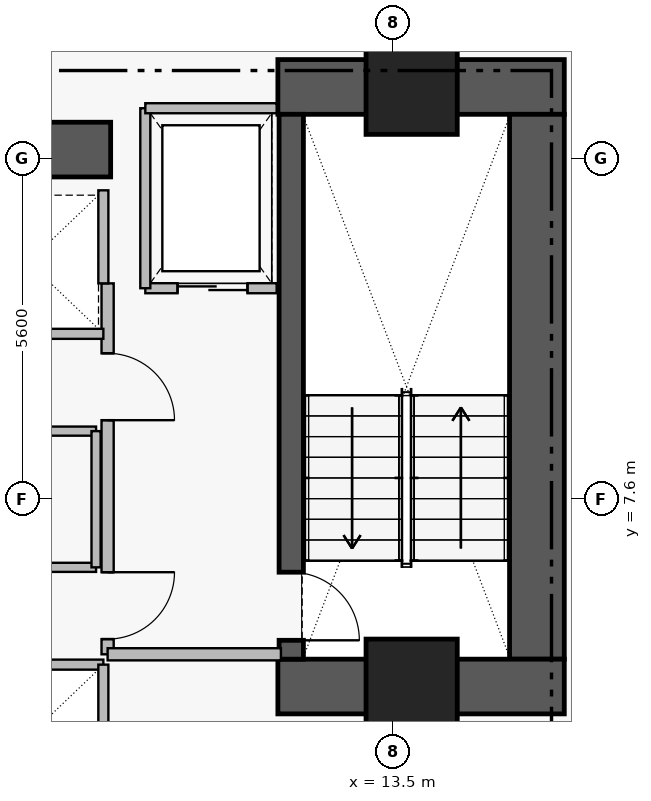
"""IFC4 building model, lengths in metres.
Left out: names, types, materials, properties, quantities, classifications, styles, units other than length and angle.
Written with IfcOpenShell. Run it as: python <this file> out.ifc"""

import sys

from ifc_helpers import new_model, si_unit, direction, frame, frame_2d, origin, origin_2d, place, context, subcontext, project, spatial, rectangle, extrude, element, fill, save


model = new_model("IFC4")
c1 = context("Model", 3, precision=1e-05, world=origin(), true_north=direction((0.0, 1.0)))
c2 = subcontext(c1, "Body", "Model", "MODEL_VIEW")
j1 = project(units=[si_unit("LENGTHUNIT", "METRE"), si_unit("PLANEANGLEUNIT", "RADIAN")], contexts=[c1])
p1 = place(None, origin())
s1 = spatial("IfcSite", under=j1, at=p1, CompositionType="ELEMENT")
p2 = place(p1, origin())
s2 = spatial("IfcBuilding", under=s1, at=p2, CompositionType="ELEMENT")
p3 = place(p2, frame((0.0, 0.0, 11.4)))
s3 = spatial("IfcBuildingStorey", under=s2, at=p3, CompositionType="ELEMENT", Elevation=11.4)
p4 = place(p3, frame((11.6, 14.38, 0.0), z_axis=(0.0, 0.0, 1.0), x_axis=(1.0, 0.0, 0.0)))
e1 = element("IfcWall", 1, at=p4, inside=s3, PredefinedType="SHEAR", context=c2, shape_type="SweptSolid", body=[
    extrude(rectangle(XDim=4.71, YDim=0.9, at=frame_2d((2.355, 0.0))), origin(), (0.0, 0.0, 1.0), 6.41),
])
p5 = place(p3, frame((15.86, 4.97, 0.0), z_axis=(0.0, 0.0, 1.0), x_axis=(0.0, 1.0, 0.0)))
e2 = element("IfcWall", 2, at=p5, inside=s3, PredefinedType="SHEAR", context=c2, shape_type="SweptSolid", body=[
    extrude(rectangle(XDim=8.96, YDim=0.9, at=frame_2d((4.48, 0.0))), origin(), (0.0, 0.0, 1.0), 6.41),
])
p6 = place(p3, frame((11.6, 4.52, 0.0), z_axis=(0.0, 0.0, 1.0), x_axis=(1.0, 0.0, 0.0)))
e3 = element("IfcWall", 3, at=p6, inside=s3, PredefinedType="SHEAR", context=c2, shape_type="SweptSolid", body=[
    extrude(rectangle(XDim=4.71, YDim=0.9, at=frame_2d((2.355, 0.0))), origin(), (0.0, 0.0, 1.0), 6.41),
])
p7 = place(p3, frame((1.25, 13.35, 0.0), z_axis=(0.0, 0.0, 1.0), x_axis=(1.0, 0.0, 0.0)))
e4 = element("IfcWall", 4, at=p7, inside=s3, PredefinedType="SHEAR", context=c2, shape_type="SweptSolid", body=[
    extrude(rectangle(XDim=7.6, YDim=0.9, at=frame_2d((3.8, 0.0))), origin(), (0.0, 0.0, 1.0), 6.34),
])
p8 = place(p3, frame((11.82, 13.93, 0.0), z_axis=(0.0, 0.0, 1.0), x_axis=(0.0, -1.0, 0.0)))
e5 = element("IfcWall", 5, at=p8, inside=s3, PredefinedType="SHEAR", context=c2, shape_type="SweptSolid", body=[
    extrude(rectangle(XDim=8.96, YDim=0.4, at=frame_2d((4.48, 0.0))), origin(), (0.0, 0.0, 1.0), 6.41),
])
p9 = place(p8, frame((7.53, 0.0, 0.0)))
e6 = element("IfcOpeningElement", 6, at=p9, cuts=e5, PredefinedType="OPENING", context=c2, shape_type="SweptSolid", body=[
    extrude(rectangle(XDim=1.12, YDim=2.22, at=frame_2d((0.56, 1.11))), frame((0.0, 0.21, 0.0), z_axis=(0.0, -1.0, 0.0), x_axis=(1.0, 0.0, 0.0)), (0.0, 0.0, 1.0), 0.42),
])
for number, where, z_axis, x_axis in (
    (7, (13.8, 14.35, 0.0), (0.0, 0.0, 1.0), (1.0, 0.0, 0.0)),
    (8, (13.8, 4.55, 0.0), (0.0, 0.0, 1.0), (1.0, 0.0, 0.0)),
):
    element("IfcColumn", number, at=place(p3, frame(where, z_axis=z_axis, x_axis=x_axis)), inside=s3, PredefinedType="COLUMN", context=c2, shape_type="SweptSolid", body=[
        extrude(rectangle(XDim=1.5, YDim=1.5, at=origin_2d()), origin(), (0.0, 0.0, 1.0), 6.6),
    ])
p10 = place(p3, frame((8.8, 11.15, 0.0), z_axis=(0.0, 0.0, 1.0), x_axis=(0.0, -1.0, 0.0)))
e9 = element("IfcWall", 9, at=p10, inside=s3, PredefinedType="PARTITIONING", context=c2, shape_type="SweptSolid", body=[
    extrude(rectangle(XDim=6.1, YDim=0.2, at=frame_2d((3.05, 0.0))), origin(), (0.0, 0.0, 1.0), 6.34),
])
p11 = place(p10, frame((1.15, 0.0, 0.0)))
e10 = element("IfcOpeningElement", 10, at=p11, cuts=e9, PredefinedType="OPENING", context=c2, shape_type="SweptSolid", body=[
    extrude(rectangle(XDim=1.1, YDim=2.2, at=frame_2d((0.55, 1.1))), frame((0.0, 0.11, 0.0), z_axis=(0.0, -1.0, 0.0), x_axis=(1.0, 0.0, 0.0)), (0.0, 0.0, 1.0), 0.22),
])
p12 = place(p10, frame((4.75, 0.0, 0.0)))
e11 = element("IfcOpeningElement", 11, at=p12, cuts=e9, PredefinedType="OPENING", context=c2, shape_type="SweptSolid", body=[
    extrude(rectangle(XDim=1.1, YDim=2.2, at=frame_2d((0.55, 1.1))), frame((0.0, 0.11, 0.0), z_axis=(0.0, -1.0, 0.0), x_axis=(1.0, 0.0, 0.0)), (0.0, 0.0, 1.0), 0.22),
])
p13 = place(p3, frame((9.42, 11.07, 0.0), z_axis=(0.0, 0.0, 1.0), x_axis=(1.0, 0.0, 0.0)))
e12 = element("IfcWall", 12, at=p13, inside=s3, PredefinedType="PARTITIONING", context=c2, shape_type="SweptSolid", body=[
    extrude(rectangle(XDim=2.16, YDim=0.165, at=frame_2d((1.08, 0.0))), origin(), (0.0, 0.0, 1.0), 6.34),
])
p14 = place(p13, frame((0.53, 0.0, 0.0)))
e13 = element("IfcOpeningElement", 13, at=p14, cuts=e12, PredefinedType="OPENING", context=c2, shape_type="SweptSolid", body=[
    extrude(rectangle(XDim=1.15, YDim=2.25, at=frame_2d((0.575, 1.125))), frame((0.0, 0.093, 0.0), z_axis=(0.0, -1.0, 0.0), x_axis=(1.0, 0.0, 0.0)), (0.0, 0.0, 1.0), 0.185),
])
p15 = place(p3, frame((4.37, 6.48, 0.0), z_axis=(0.0, 0.0, 1.0), x_axis=(1.0, 0.0, 0.0)))
e14 = element("IfcWall", 14, at=p15, inside=s3, PredefinedType="PARTITIONING", context=c2, shape_type="SweptSolid", body=[
    extrude(rectangle(XDim=4.24, YDim=0.15, at=frame_2d((2.12, 0.0))), origin(), (0.0, 0.0, 1.0), 6.34),
])
p16 = place(p15, frame((1.67, 0.0, 0.0)))
e15 = element("IfcOpeningElement", 15, at=p16, cuts=e14, PredefinedType="OPENING", context=c2, shape_type="SweptSolid", body=[
    extrude(rectangle(XDim=0.9, YDim=2.15, at=frame_2d((0.45, 1.075))), frame((0.0, 0.085, 0.0), z_axis=(0.0, -1.0, 0.0), x_axis=(1.0, 0.0, 0.0)), (0.0, 0.0, 1.0), 0.17),
])
p17 = place(p3, frame((8.8, 5.05, 0.0), z_axis=(0.0, 0.0, 1.0), x_axis=(1.0, 0.0, 0.0)))
e16 = element("IfcWall", 16, at=p17, inside=s3, PredefinedType="PARTITIONING", context=c2, shape_type="SweptSolid", body=[
    extrude(rectangle(XDim=2.85, YDim=0.2, at=frame_2d((1.425, 0.0))), origin(), (0.0, 0.0, 1.0), 6.34),
])
p18 = place(p3, frame((9.42, 11.07, 0.0), z_axis=(0.0, 0.0, 1.0), x_axis=(0.0, 1.0, 0.0)))
e17 = element("IfcWall", 17, at=p18, inside=s3, PredefinedType="PARTITIONING", context=c2, shape_type="SweptSolid", body=[
    extrude(rectangle(XDim=2.96, YDim=0.165, at=frame_2d((1.48, 0.0))), origin(), (0.0, 0.0, 1.0), 6.34),
])
p19 = place(p3, frame((9.42, 14.03, 0.0), z_axis=(0.0, 0.0, 1.0), x_axis=(1.0, 0.0, 0.0)))
e18 = element("IfcWall", 18, at=p19, inside=s3, PredefinedType="PARTITIONING", context=c2, shape_type="SweptSolid", body=[
    extrude(rectangle(XDim=2.16, YDim=0.165, at=frame_2d((1.08, 0.0))), origin(), (0.0, 0.0, 1.0), 6.34),
])
p20 = place(p3, frame((6.25, 4.88, 0.0), z_axis=(0.0, 0.0, 1.0), x_axis=(1.0, 0.0, 0.0)))
e19 = element("IfcWall", 19, at=p20, inside=s3, PredefinedType="PARTITIONING", context=c2, shape_type="SweptSolid", body=[
    extrude(rectangle(XDim=2.48, YDim=0.165, at=frame_2d((1.24, 0.0))), origin(), (0.0, 0.0, 1.0), 6.34),
])
p21 = place(p3, frame((8.73, 2.52, 0.0), z_axis=(0.0, 0.0, 1.0), x_axis=(0.0, 1.0, 0.0)))
e20 = element("IfcWall", 20, at=p21, inside=s3, PredefinedType="PARTITIONING", context=c2, shape_type="SweptSolid", body=[
    extrude(rectangle(XDim=2.36, YDim=0.165, at=frame_2d((1.18, 0.0))), origin(), (0.0, 0.0, 1.0), 6.34),
])
p22 = place(p3, frame((6.25, 10.32, 0.0), z_axis=(0.0, 0.0, 1.0), x_axis=(1.0, 0.0, 0.0)))
e21 = element("IfcWall", 21, at=p22, inside=s3, PredefinedType="PARTITIONING", context=c2, shape_type="SweptSolid", body=[
    extrude(rectangle(XDim=2.48, YDim=0.165, at=frame_2d((1.24, 0.0))), origin(), (0.0, 0.0, 1.0), 6.34),
])
p23 = place(p3, frame((8.73, 11.15, 0.0), z_axis=(0.0, 0.0, 1.0), x_axis=(0.0, 1.0, 0.0)))
e22 = element("IfcWall", 22, at=p23, inside=s3, PredefinedType="PARTITIONING", context=c2, shape_type="SweptSolid", body=[
    extrude(rectangle(XDim=1.53, YDim=0.165, at=frame_2d((0.765, 0.0))), origin(), (0.0, 0.0, 1.0), 6.34),
])
p24 = place(p3, frame((4.37, 8.72, 0.0), z_axis=(0.0, 0.0, 1.0), x_axis=(1.0, 0.0, 0.0)))
e23 = element("IfcWall", 23, at=p24, inside=s3, PredefinedType="PARTITIONING", context=c2, shape_type="SweptSolid", body=[
    extrude(rectangle(XDim=4.24, YDim=0.15, at=frame_2d((2.12, 0.0))), origin(), (0.0, 0.0, 1.0), 6.34),
])
p25 = place(p3, frame((8.61, 6.48, 0.0), z_axis=(0.0, 0.0, 1.0), x_axis=(0.0, 1.0, 0.0)))
e24 = element("IfcWall", 24, at=p25, inside=s3, PredefinedType="PARTITIONING", context=c2, shape_type="SweptSolid", body=[
    extrude(rectangle(XDim=2.24, YDim=0.15, at=frame_2d((1.12, 0.0))), origin(), (0.0, 0.0, 1.0), 6.34),
])
p26 = place(p9, origin())
e25 = element("IfcDoor", 25, at=p26, inside=s3, OperationType="SINGLE_SWING_RIGHT", PredefinedType="DOOR", context=c2, shape_type="SweptSolid", body=[
    extrude(rectangle(XDim=1.12, YDim=2.22, at=frame_2d((0.56, 1.11))), frame((0.0, 0.025, 0.0), z_axis=(0.0, -1.0, 0.0), x_axis=(1.0, 0.0, 0.0)), (0.0, 0.0, 1.0), 0.05),
])
fill(e6, e25)
p27 = place(p11, origin())
e26 = element("IfcDoor", 26, at=p27, inside=s3, OperationType="SINGLE_SWING_RIGHT", PredefinedType="DOOR", context=c2, shape_type="SweptSolid", body=[
    extrude(rectangle(XDim=1.1, YDim=2.2, at=frame_2d((0.55, 1.1))), frame((0.0, 0.025, 0.0), z_axis=(0.0, -1.0, 0.0), x_axis=(1.0, 0.0, 0.0)), (0.0, 0.0, 1.0), 0.05),
])
fill(e10, e26)
p28 = place(p12, origin())
e27 = element("IfcDoor", 27, at=p28, inside=s3, OperationType="SINGLE_SWING_LEFT", PredefinedType="DOOR", context=c2, shape_type="SweptSolid", body=[
    extrude(rectangle(XDim=1.1, YDim=2.2, at=frame_2d((0.55, 1.1))), frame((0.0, 0.025, 0.0), z_axis=(0.0, -1.0, 0.0), x_axis=(1.0, 0.0, 0.0)), (0.0, 0.0, 1.0), 0.05),
])
fill(e11, e27)
p29 = place(p14, origin())
e28 = element("IfcDoor", 28, at=p29, inside=s3, OperationType="SLIDING_TO_LEFT", PredefinedType="DOOR", context=c2, shape_type="SweptSolid", body=[
    extrude(rectangle(XDim=1.15, YDim=2.25, at=frame_2d((0.575, 1.125))), frame((0.0, 0.025, 0.0), z_axis=(0.0, -1.0, 0.0), x_axis=(1.0, 0.0, 0.0)), (0.0, 0.0, 1.0), 0.05),
])
fill(e13, e28)
save(model, sys.argv[1])
